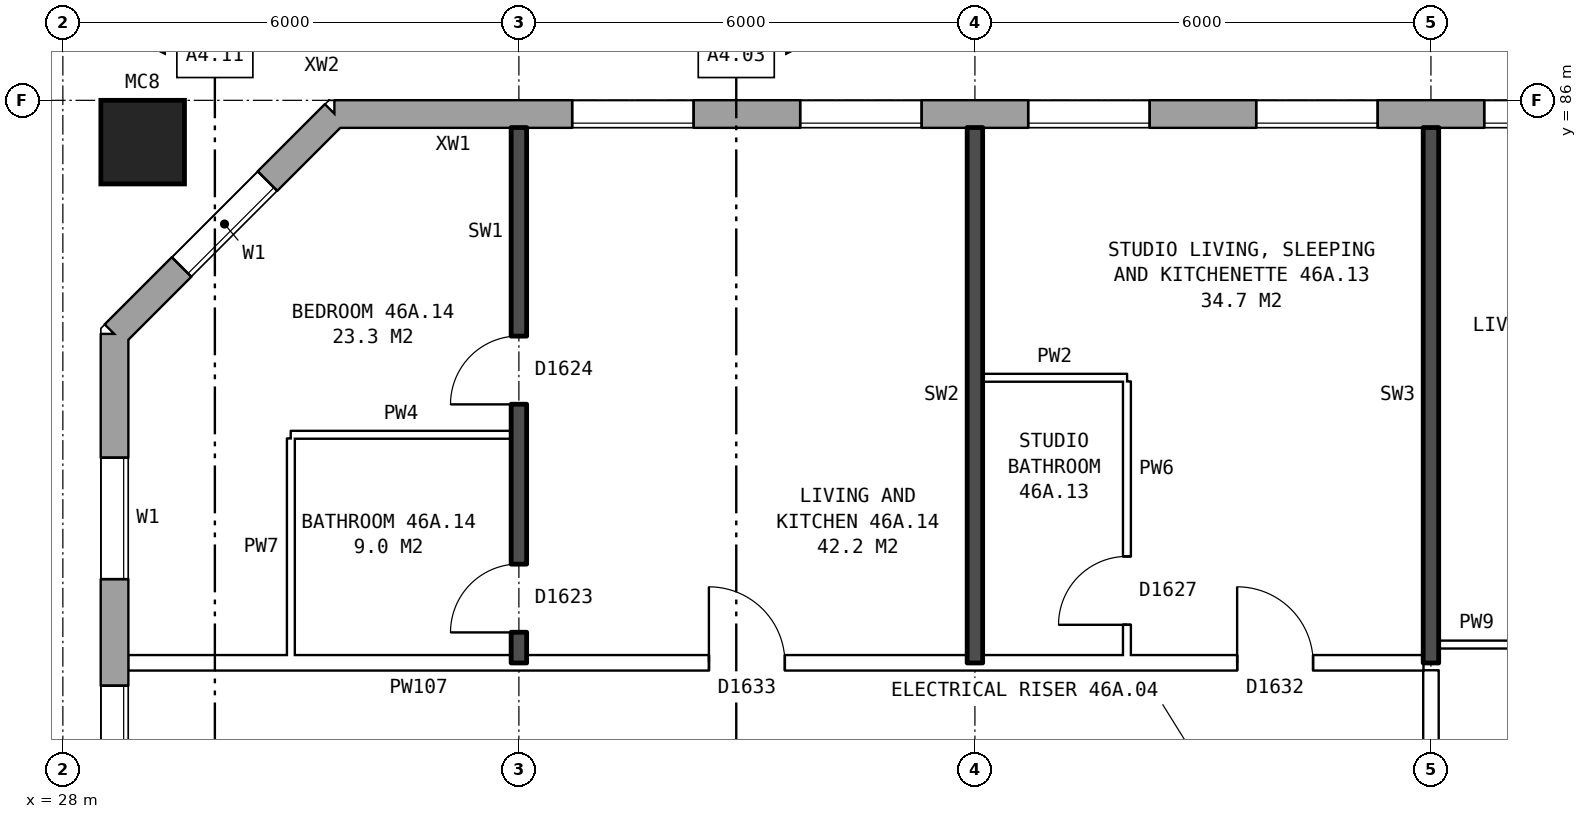
"""IFC4 building model, lengths in metres.
Left out: names, types, materials, properties, quantities, classifications, styles, units other than length and angle.
Written with IfcOpenShell. Run it as: python <this file> out.ifc"""

import sys

from ifc_helpers import new_model, si_unit, direction, frame, frame_2d, origin, origin_2d, place, context, subcontext, project, spatial, rectangle, hollow_rectangle, extrude, element, fill, save


model = new_model("IFC4")
c1 = context("Model", 3, precision=1e-05, world=origin(), true_north=direction((0.0, 1.0)))
c2 = subcontext(c1, "Body", "Model", "MODEL_VIEW")
j1 = project(units=[si_unit("LENGTHUNIT", "METRE"), si_unit("PLANEANGLEUNIT", "RADIAN")], contexts=[c1])
p1 = place(None, origin())
s1 = spatial("IfcSite", under=j1, at=p1, CompositionType="ELEMENT")
p2 = place(p1, origin())
s2 = spatial("IfcBuilding", under=s1, at=p2, CompositionType="ELEMENT")
p3 = place(p2, frame((0.0, 0.0, 164.0)))
s3 = spatial("IfcBuildingStorey", under=s2, at=p3, CompositionType="ELEMENT", Elevation=164.0)
p4 = place(p3, frame((29.05, 85.45, 0.0), z_axis=(0.0, 0.0, 1.0), x_axis=(1.0, 0.0, 0.0)))
e1 = element("IfcColumn", 1, at=p4, inside=s3, PredefinedType="COLUMN", context=c2, shape_type="SweptSolid", body=[
    extrude(hollow_rectangle(XDim=1.1, YDim=1.1, WallThickness=0.06, at=origin_2d()), origin(), (0.0, 0.0, 1.0), 3.1),
])
p5 = place(p3, frame((72.925, 85.82, 0.0), z_axis=(0.0, 0.0, 1.0), x_axis=(-1.0, 0.0, 0.0)))
e2 = element("IfcWall", 2, at=p5, inside=s3, PredefinedType="STANDARD", context=c2, shape_type="SweptSolid", body=[
    extrude(rectangle(XDim=41.351, YDim=0.36, at=frame_2d((20.675, 0.0))), origin(), (0.0, 0.0, 1.0), 2.85),
])
p6 = place(p5, frame((0.625, 0.0, 0.8)))
e3 = element("IfcOpeningElement", 3, at=p6, cuts=e2, PredefinedType="OPENING", context=c2, shape_type="SweptSolid", body=[
    extrude(rectangle(XDim=1.6, YDim=1.8, at=frame_2d((0.8, 0.9))), frame((0.0, 0.19, 0.0), z_axis=(0.0, -1.0, 0.0), x_axis=(1.0, 0.0, 0.0)), (0.0, 0.0, 1.0), 0.38),
])
p7 = place(p5, frame((3.625, 0.0, 0.8)))
e4 = element("IfcOpeningElement", 4, at=p7, cuts=e2, PredefinedType="OPENING", context=c2, shape_type="SweptSolid", body=[
    extrude(rectangle(XDim=1.6, YDim=1.8, at=frame_2d((0.8, 0.9))), frame((0.0, 0.19, 0.0), z_axis=(0.0, -1.0, 0.0), x_axis=(1.0, 0.0, 0.0)), (0.0, 0.0, 1.0), 0.38),
])
p8 = place(p5, frame((6.625, 0.0, 0.8)))
e5 = element("IfcOpeningElement", 5, at=p8, cuts=e2, PredefinedType="OPENING", context=c2, shape_type="SweptSolid", body=[
    extrude(rectangle(XDim=1.6, YDim=1.8, at=frame_2d((0.8, 0.9))), frame((0.0, 0.19, 0.0), z_axis=(0.0, -1.0, 0.0), x_axis=(1.0, 0.0, 0.0)), (0.0, 0.0, 1.0), 0.38),
])
p9 = place(p5, frame((9.625, 0.0, 0.8)))
e6 = element("IfcOpeningElement", 6, at=p9, cuts=e2, PredefinedType="OPENING", context=c2, shape_type="SweptSolid", body=[
    extrude(rectangle(XDim=1.6, YDim=1.8, at=frame_2d((0.8, 0.9))), frame((0.0, 0.19, 0.0), z_axis=(0.0, -1.0, 0.0), x_axis=(1.0, 0.0, 0.0)), (0.0, 0.0, 1.0), 0.38),
])
p10 = place(p5, frame((12.625, 0.0, 0.8)))
e7 = element("IfcOpeningElement", 7, at=p10, cuts=e2, PredefinedType="OPENING", context=c2, shape_type="SweptSolid", body=[
    extrude(rectangle(XDim=1.6, YDim=1.8, at=frame_2d((0.8, 0.9))), frame((0.0, 0.19, 0.0), z_axis=(0.0, -1.0, 0.0), x_axis=(1.0, 0.0, 0.0)), (0.0, 0.0, 1.0), 0.38),
])
p11 = place(p5, frame((15.625, 0.0, 0.8)))
e8 = element("IfcOpeningElement", 8, at=p11, cuts=e2, PredefinedType="OPENING", context=c2, shape_type="SweptSolid", body=[
    extrude(rectangle(XDim=1.6, YDim=1.8, at=frame_2d((0.8, 0.9))), frame((0.0, 0.19, 0.0), z_axis=(0.0, -1.0, 0.0), x_axis=(1.0, 0.0, 0.0)), (0.0, 0.0, 1.0), 0.38),
])
p12 = place(p5, frame((18.075, 0.0, 1.65)))
e9 = element("IfcOpeningElement", 9, at=p12, cuts=e2, PredefinedType="OPENING", context=c2, shape_type="SweptSolid", body=[
    extrude(rectangle(XDim=0.6, YDim=0.9, at=frame_2d((0.3, 0.45))), frame((0.0, 0.19, 0.0), z_axis=(0.0, -1.0, 0.0), x_axis=(1.0, 0.0, 0.0)), (0.0, 0.0, 1.0), 0.38),
])
p13 = place(p5, frame((21.125, 0.0, 0.15)))
e10 = element("IfcOpeningElement", 10, at=p13, cuts=e2, PredefinedType="OPENING", context=c2, shape_type="SweptSolid", body=[
    extrude(rectangle(XDim=1.0, YDim=0.9, at=frame_2d((0.5, 0.45))), frame((0.0, 0.19, 0.0), z_axis=(0.0, -1.0, 0.0), x_axis=(1.0, 0.0, 0.0)), (0.0, 0.0, 1.0), 0.38),
])
p14 = place(p5, frame((24.625, 0.0, 0.8)))
e11 = element("IfcOpeningElement", 11, at=p14, cuts=e2, PredefinedType="OPENING", context=c2, shape_type="SweptSolid", body=[
    extrude(rectangle(XDim=1.6, YDim=1.8, at=frame_2d((0.8, 0.9))), frame((0.0, 0.19, 0.0), z_axis=(0.0, -1.0, 0.0), x_axis=(1.0, 0.0, 0.0)), (0.0, 0.0, 1.0), 0.38),
])
p15 = place(p5, frame((27.625, 0.0, 0.8)))
e12 = element("IfcOpeningElement", 12, at=p15, cuts=e2, PredefinedType="OPENING", context=c2, shape_type="SweptSolid", body=[
    extrude(rectangle(XDim=1.6, YDim=1.8, at=frame_2d((0.8, 0.9))), frame((0.0, 0.19, 0.0), z_axis=(0.0, -1.0, 0.0), x_axis=(1.0, 0.0, 0.0)), (0.0, 0.0, 1.0), 0.38),
])
p16 = place(p5, frame((30.625, 0.0, 0.8)))
e13 = element("IfcOpeningElement", 13, at=p16, cuts=e2, PredefinedType="OPENING", context=c2, shape_type="SweptSolid", body=[
    extrude(rectangle(XDim=1.6, YDim=1.8, at=frame_2d((0.8, 0.9))), frame((0.0, 0.19, 0.0), z_axis=(0.0, -1.0, 0.0), x_axis=(1.0, 0.0, 0.0)), (0.0, 0.0, 1.0), 0.38),
])
p17 = place(p5, frame((33.625, 0.0, 0.8)))
e14 = element("IfcOpeningElement", 14, at=p17, cuts=e2, PredefinedType="OPENING", context=c2, shape_type="SweptSolid", body=[
    extrude(rectangle(XDim=1.6, YDim=1.8, at=frame_2d((0.8, 0.9))), frame((0.0, 0.19, 0.0), z_axis=(0.0, -1.0, 0.0), x_axis=(1.0, 0.0, 0.0)), (0.0, 0.0, 1.0), 0.38),
])
p18 = place(p5, frame((36.625, 0.0, 0.8)))
e15 = element("IfcOpeningElement", 15, at=p18, cuts=e2, PredefinedType="OPENING", context=c2, shape_type="SweptSolid", body=[
    extrude(rectangle(XDim=1.6, YDim=1.8, at=frame_2d((0.8, 0.9))), frame((0.0, 0.19, 0.0), z_axis=(0.0, -1.0, 0.0), x_axis=(1.0, 0.0, 0.0)), (0.0, 0.0, 1.0), 0.38),
])
p19 = place(p5, frame((19.225, 0.0, 0.15)))
e16 = element("IfcOpeningElement", 16, at=p19, cuts=e2, PredefinedType="OPENING", context=c2, shape_type="SweptSolid", body=[
    extrude(rectangle(XDim=0.6, YDim=0.9, at=frame_2d((0.3, 0.45))), frame((0.0, 0.19, 0.0), z_axis=(0.0, -1.0, 0.0), x_axis=(1.0, 0.0, 0.0)), (0.0, 0.0, 1.0), 0.38),
])
p20 = place(p5, frame((20.125, 0.0, 0.25)))
e17 = element("IfcOpeningElement", 17, at=p20, cuts=e2, PredefinedType="OPENING", context=c2, shape_type="SweptSolid", body=[
    extrude(rectangle(XDim=0.6, YDim=1.5, at=frame_2d((0.3, 0.75))), frame((0.0, 0.19, 0.0), z_axis=(0.0, -1.0, 0.0), x_axis=(1.0, 0.0, 0.0)), (0.0, 0.0, 1.0), 0.38),
])
p21 = place(p5, frame((22.625, 0.0, 1.65)))
e18 = element("IfcOpeningElement", 18, at=p21, cuts=e2, PredefinedType="OPENING", context=c2, shape_type="SweptSolid", body=[
    extrude(rectangle(XDim=1.0, YDim=0.9, at=frame_2d((0.5, 0.45))), frame((0.0, 0.19, 0.0), z_axis=(0.0, -1.0, 0.0), x_axis=(1.0, 0.0, 0.0)), (0.0, 0.0, 1.0), 0.38),
])
p22 = place(p3, frame((31.575, 85.82, 0.0), z_axis=(0.0, 0.0, 1.0), x_axis=(-0.707106781187, -0.707106781187, 0.0)))
e19 = element("IfcWall", 19, at=p22, inside=s3, PredefinedType="STANDARD", context=c2, shape_type="SweptSolid", body=[
    extrude(rectangle(XDim=4.094, YDim=0.36, at=frame_2d((2.047, 0.0))), origin(), (0.0, 0.0, 1.0), 2.85),
])
p23 = place(p22, frame((1.247, 0.0, 0.8)))
e20 = element("IfcOpeningElement", 20, at=p23, cuts=e19, PredefinedType="OPENING", context=c2, shape_type="SweptSolid", body=[
    extrude(rectangle(XDim=1.6, YDim=1.8, at=frame_2d((0.8, 0.9))), frame((0.0, 0.19, 0.0), z_axis=(0.0, -1.0, 0.0), x_axis=(1.0, 0.0, 0.0)), (0.0, 0.0, 1.0), 0.38),
])
p24 = place(p3, frame((28.68, 82.925, 0.0), z_axis=(0.0, 0.0, 1.0), x_axis=(0.0, -1.0, 0.0)))
e21 = element("IfcWall", 21, at=p24, inside=s3, PredefinedType="STANDARD", context=c2, shape_type="SweptSolid", body=[
    extrude(rectangle(XDim=25.851, YDim=0.36, at=frame_2d((12.925, 0.0))), origin(), (0.0, 0.0, 1.0), 2.85),
])
p25 = place(p24, frame((1.625, 0.0, 0.8)))
e22 = element("IfcOpeningElement", 22, at=p25, cuts=e21, PredefinedType="OPENING", context=c2, shape_type="SweptSolid", body=[
    extrude(rectangle(XDim=1.6, YDim=1.8, at=frame_2d((0.8, 0.9))), frame((0.0, 0.19, 0.0), z_axis=(0.0, -1.0, 0.0), x_axis=(1.0, 0.0, 0.0)), (0.0, 0.0, 1.0), 0.38),
])
p26 = place(p24, frame((4.625, 0.0, 0.8)))
e23 = element("IfcOpeningElement", 23, at=p26, cuts=e21, PredefinedType="OPENING", context=c2, shape_type="SweptSolid", body=[
    extrude(rectangle(XDim=1.6, YDim=1.8, at=frame_2d((0.8, 0.9))), frame((0.0, 0.19, 0.0), z_axis=(0.0, -1.0, 0.0), x_axis=(1.0, 0.0, 0.0)), (0.0, 0.0, 1.0), 0.38),
])
p27 = place(p24, frame((7.625, 0.0, 0.8)))
e24 = element("IfcOpeningElement", 24, at=p27, cuts=e21, PredefinedType="OPENING", context=c2, shape_type="SweptSolid", body=[
    extrude(rectangle(XDim=1.6, YDim=1.8, at=frame_2d((0.8, 0.9))), frame((0.0, 0.19, 0.0), z_axis=(0.0, -1.0, 0.0), x_axis=(1.0, 0.0, 0.0)), (0.0, 0.0, 1.0), 0.38),
])
p28 = place(p24, frame((10.625, 0.0, 0.8)))
e25 = element("IfcOpeningElement", 25, at=p28, cuts=e21, PredefinedType="OPENING", context=c2, shape_type="SweptSolid", body=[
    extrude(rectangle(XDim=1.6, YDim=1.8, at=frame_2d((0.8, 0.9))), frame((0.0, 0.19, 0.0), z_axis=(0.0, -1.0, 0.0), x_axis=(1.0, 0.0, 0.0)), (0.0, 0.0, 1.0), 0.38),
])
p29 = place(p24, frame((13.625, 0.0, 0.8)))
e26 = element("IfcOpeningElement", 26, at=p29, cuts=e21, PredefinedType="OPENING", context=c2, shape_type="SweptSolid", body=[
    extrude(rectangle(XDim=1.6, YDim=1.8, at=frame_2d((0.8, 0.9))), frame((0.0, 0.19, 0.0), z_axis=(0.0, -1.0, 0.0), x_axis=(1.0, 0.0, 0.0)), (0.0, 0.0, 1.0), 0.38),
])
p30 = place(p24, frame((16.625, 0.0, 0.8)))
e27 = element("IfcOpeningElement", 27, at=p30, cuts=e21, PredefinedType="OPENING", context=c2, shape_type="SweptSolid", body=[
    extrude(rectangle(XDim=1.6, YDim=1.8, at=frame_2d((0.8, 0.9))), frame((0.0, 0.19, 0.0), z_axis=(0.0, -1.0, 0.0), x_axis=(1.0, 0.0, 0.0)), (0.0, 0.0, 1.0), 0.38),
])
p31 = place(p24, frame((19.625, 0.0, 0.8)))
e28 = element("IfcOpeningElement", 28, at=p31, cuts=e21, PredefinedType="OPENING", context=c2, shape_type="SweptSolid", body=[
    extrude(rectangle(XDim=1.6, YDim=1.8, at=frame_2d((0.8, 0.9))), frame((0.0, 0.19, 0.0), z_axis=(0.0, -1.0, 0.0), x_axis=(1.0, 0.0, 0.0)), (0.0, 0.0, 1.0), 0.38),
])
p32 = place(p24, frame((22.625, 0.0, 0.8)))
e29 = element("IfcOpeningElement", 29, at=p32, cuts=e21, PredefinedType="OPENING", context=c2, shape_type="SweptSolid", body=[
    extrude(rectangle(XDim=1.6, YDim=1.8, at=frame_2d((0.8, 0.9))), frame((0.0, 0.19, 0.0), z_axis=(0.0, -1.0, 0.0), x_axis=(1.0, 0.0, 0.0)), (0.0, 0.0, 1.0), 0.38),
])
p33 = place(p3, frame((28.86, 78.6, 0.0), z_axis=(0.0, 0.0, 1.0), x_axis=(1.0, 0.0, 0.0)))
e30 = element("IfcWall", 30, at=p33, inside=s3, PredefinedType="PARTITIONING", context=c2, shape_type="SweptSolid", body=[
    extrude(rectangle(XDim=17.04, YDim=0.2, at=frame_2d((8.52, 0.0))), origin(), (0.0, 0.0, 1.0), 2.85),
])
p34 = place(p33, frame((14.59, 0.0, 0.0)))
e31 = element("IfcOpeningElement", 31, at=p34, cuts=e30, PredefinedType="OPENING", context=c2, shape_type="SweptSolid", body=[
    extrude(rectangle(XDim=1.0, YDim=2.1, at=frame_2d((0.5, 1.05))), frame((0.0, 0.11, 0.0), z_axis=(0.0, -1.0, 0.0), x_axis=(1.0, 0.0, 0.0)), (0.0, 0.0, 1.0), 0.22),
])
p35 = place(p33, frame((7.64, 0.0, 0.0)))
e32 = element("IfcOpeningElement", 32, at=p35, cuts=e30, PredefinedType="OPENING", context=c2, shape_type="SweptSolid", body=[
    extrude(rectangle(XDim=1.0, YDim=2.1, at=frame_2d((0.5, 1.05))), frame((0.0, 0.11, 0.0), z_axis=(0.0, -1.0, 0.0), x_axis=(1.0, 0.0, 0.0)), (0.0, 0.0, 1.0), 0.22),
])
p36 = place(p3, frame((46.1, 78.84, 0.0), z_axis=(0.0, 0.0, 1.0), x_axis=(1.0, 0.0, 0.0)))
e33 = element("IfcWall", 33, at=p36, inside=s3, PredefinedType="PARTITIONING", context=c2, shape_type="SweptSolid", body=[
    extrude(rectangle(XDim=2.9, YDim=0.1, at=frame_2d((1.45, 0.0))), origin(), (0.0, 0.0, 1.0), 2.85),
])
p37 = place(p36, frame((1.0, 0.0, 0.0)))
e34 = element("IfcOpeningElement", 34, at=p37, cuts=e33, PredefinedType="OPENING", context=c2, shape_type="SweptSolid", body=[
    extrude(rectangle(XDim=0.9, YDim=2.1, at=frame_2d((0.45, 1.05))), frame((0.0, 0.06, 0.0), z_axis=(0.0, -1.0, 0.0), x_axis=(1.0, 0.0, 0.0)), (0.0, 0.0, 1.0), 0.12),
])
p38 = place(p3, frame((31.0, 81.6, 0.0), z_axis=(0.0, 0.0, 1.0), x_axis=(1.0, 0.0, 0.0)))
e35 = element("IfcWall", 35, at=p38, inside=s3, PredefinedType="PARTITIONING", context=c2, shape_type="SweptSolid", body=[
    extrude(rectangle(XDim=2.9, YDim=0.1, at=frame_2d((1.45, 0.0))), origin(), (0.0, 0.0, 1.0), 2.85),
])
p39 = place(p3, frame((40.1, 82.35, 0.0), z_axis=(0.0, 0.0, 1.0), x_axis=(1.0, 0.0, 0.0)))
e36 = element("IfcWall", 36, at=p39, inside=s3, PredefinedType="PARTITIONING", context=c2, shape_type="SweptSolid", body=[
    extrude(rectangle(XDim=1.9, YDim=0.1, at=frame_2d((0.95, 0.0))), origin(), (0.0, 0.0, 1.0), 2.85),
])
p40 = place(p3, frame((31.0, 78.7, 0.0), z_axis=(0.0, 0.0, 1.0), x_axis=(0.0, 1.0, 0.0)))
e37 = element("IfcWall", 37, at=p40, inside=s3, PredefinedType="PARTITIONING", context=c2, shape_type="SweptSolid", body=[
    extrude(rectangle(XDim=2.85, YDim=0.1, at=frame_2d((1.425, 0.0))), origin(), (0.0, 0.0, 1.0), 2.85),
])
p41 = place(p3, frame((34.0, 78.6, 0.0), z_axis=(0.0, 0.0, 1.0), x_axis=(0.0, 1.0, 0.0)))
e38 = element("IfcWall", 38, at=p41, inside=s3, PredefinedType="SOLIDWALL", context=c2, shape_type="SweptSolid", body=[
    extrude(rectangle(XDim=7.04, YDim=0.2, at=frame_2d((3.52, 0.0))), origin(), (0.0, 0.0, 1.0), 2.85),
])
p42 = place(p41, frame((3.4, 0.0, 0.0)))
e39 = element("IfcOpeningElement", 39, at=p42, cuts=e38, PredefinedType="OPENING", context=c2, shape_type="SweptSolid", body=[
    extrude(rectangle(XDim=0.9, YDim=2.1, at=frame_2d((0.45, 1.05))), frame((0.0, 0.11, 0.0), z_axis=(0.0, -1.0, 0.0), x_axis=(1.0, 0.0, 0.0)), (0.0, 0.0, 1.0), 0.22),
])
p43 = place(p41, frame((0.4, 0.0, 0.0)))
e40 = element("IfcOpeningElement", 40, at=p43, cuts=e38, PredefinedType="OPENING", context=c2, shape_type="SweptSolid", body=[
    extrude(rectangle(XDim=0.9, YDim=2.1, at=frame_2d((0.45, 1.05))), frame((0.0, 0.11, 0.0), z_axis=(0.0, -1.0, 0.0), x_axis=(1.0, 0.0, 0.0)), (0.0, 0.0, 1.0), 0.22),
])
p44 = place(p3, frame((40.0, 78.6, 0.0), z_axis=(0.0, 0.0, 1.0), x_axis=(0.0, 1.0, 0.0)))
e41 = element("IfcWall", 41, at=p44, inside=s3, PredefinedType="SOLIDWALL", context=c2, shape_type="SweptSolid", body=[
    extrude(rectangle(XDim=7.04, YDim=0.2, at=frame_2d((3.52, 0.0))), origin(), (0.0, 0.0, 1.0), 2.85),
])
p45 = place(p3, frame((42.0, 78.7, 0.0), z_axis=(0.0, 0.0, 1.0), x_axis=(0.0, 1.0, 0.0)))
e42 = element("IfcWall", 42, at=p45, inside=s3, PredefinedType="PARTITIONING", context=c2, shape_type="SweptSolid", body=[
    extrude(rectangle(XDim=3.6, YDim=0.1, at=frame_2d((1.8, 0.0))), origin(), (0.0, 0.0, 1.0), 2.85),
])
p46 = place(p45, frame((0.4, 0.0, 0.0)))
e43 = element("IfcOpeningElement", 43, at=p46, cuts=e42, PredefinedType="OPENING", context=c2, shape_type="SweptSolid", body=[
    extrude(rectangle(XDim=0.9, YDim=2.1, at=frame_2d((0.45, 1.05))), frame((0.0, 0.06, 0.0), z_axis=(0.0, -1.0, 0.0), x_axis=(1.0, 0.0, 0.0)), (0.0, 0.0, 1.0), 0.12),
])
p47 = place(p3, frame((46.0, 76.3, 0.0), z_axis=(0.0, 0.0, 1.0), x_axis=(0.0, 1.0, 0.0)))
e44 = element("IfcWall", 44, at=p47, inside=s3, PredefinedType="PARTITIONING", context=c2, shape_type="SweptSolid", body=[
    extrude(rectangle(XDim=2.2, YDim=0.2, at=frame_2d((1.1, 0.0))), origin(), (0.0, 0.0, 1.0), 2.85),
])
p48 = place(p3, frame((46.0, 78.6, 0.0), z_axis=(0.0, 0.0, 1.0), x_axis=(0.0, 1.0, 0.0)))
e45 = element("IfcWall", 45, at=p48, inside=s3, PredefinedType="SOLIDWALL", context=c2, shape_type="SweptSolid", body=[
    extrude(rectangle(XDim=7.04, YDim=0.2, at=frame_2d((3.52, 0.0))), origin(), (0.0, 0.0, 1.0), 2.85),
])
p49 = place(p14, origin())
e46 = element("IfcWindow", 46, at=p49, inside=s3, PartitioningType="SINGLE_PANEL", PredefinedType="WINDOW", context=c2, shape_type="SweptSolid", body=[
    extrude(rectangle(XDim=1.6, YDim=1.8, at=frame_2d((0.8, 0.9))), frame((0.0, 0.15, 0.0), z_axis=(0.0, -1.0, 0.0), x_axis=(1.0, 0.0, 0.0)), (0.0, 0.0, 1.0), 0.06),
])
fill(e11, e46)
p50 = place(p15, origin())
e47 = element("IfcWindow", 47, at=p50, inside=s3, PartitioningType="SINGLE_PANEL", PredefinedType="WINDOW", context=c2, shape_type="SweptSolid", body=[
    extrude(rectangle(XDim=1.6, YDim=1.8, at=frame_2d((0.8, 0.9))), frame((0.0, 0.15, 0.0), z_axis=(0.0, -1.0, 0.0), x_axis=(1.0, 0.0, 0.0)), (0.0, 0.0, 1.0), 0.06),
])
fill(e12, e47)
p51 = place(p16, origin())
e48 = element("IfcWindow", 48, at=p51, inside=s3, PartitioningType="SINGLE_PANEL", PredefinedType="WINDOW", context=c2, shape_type="SweptSolid", body=[
    extrude(rectangle(XDim=1.6, YDim=1.8, at=frame_2d((0.8, 0.9))), frame((0.0, 0.15, 0.0), z_axis=(0.0, -1.0, 0.0), x_axis=(1.0, 0.0, 0.0)), (0.0, 0.0, 1.0), 0.06),
])
fill(e13, e48)
p52 = place(p17, origin())
e49 = element("IfcWindow", 49, at=p52, inside=s3, PartitioningType="SINGLE_PANEL", PredefinedType="WINDOW", context=c2, shape_type="SweptSolid", body=[
    extrude(rectangle(XDim=1.6, YDim=1.8, at=frame_2d((0.8, 0.9))), frame((0.0, 0.15, 0.0), z_axis=(0.0, -1.0, 0.0), x_axis=(1.0, 0.0, 0.0)), (0.0, 0.0, 1.0), 0.06),
])
fill(e14, e49)
p53 = place(p18, origin())
e50 = element("IfcWindow", 50, at=p53, inside=s3, PartitioningType="SINGLE_PANEL", PredefinedType="WINDOW", context=c2, shape_type="SweptSolid", body=[
    extrude(rectangle(XDim=1.6, YDim=1.8, at=frame_2d((0.8, 0.9))), frame((0.0, 0.15, 0.0), z_axis=(0.0, -1.0, 0.0), x_axis=(1.0, 0.0, 0.0)), (0.0, 0.0, 1.0), 0.06),
])
fill(e15, e50)
p54 = place(p23, origin())
e51 = element("IfcWindow", 51, at=p54, inside=s3, PartitioningType="SINGLE_PANEL", PredefinedType="WINDOW", context=c2, shape_type="SweptSolid", body=[
    extrude(rectangle(XDim=1.6, YDim=1.8, at=frame_2d((0.8, 0.9))), frame((0.0, 0.15, 0.0), z_axis=(0.0, -1.0, 0.0), x_axis=(1.0, 0.0, 0.0)), (0.0, 0.0, 1.0), 0.06),
])
fill(e20, e51)
p55 = place(p25, origin())
e52 = element("IfcWindow", 52, at=p55, inside=s3, PartitioningType="SINGLE_PANEL", PredefinedType="WINDOW", context=c2, shape_type="SweptSolid", body=[
    extrude(rectangle(XDim=1.6, YDim=1.8, at=frame_2d((0.8, 0.9))), frame((0.0, 0.15, 0.0), z_axis=(0.0, -1.0, 0.0), x_axis=(1.0, 0.0, 0.0)), (0.0, 0.0, 1.0), 0.06),
])
fill(e22, e52)
p56 = place(p26, origin())
e53 = element("IfcWindow", 53, at=p56, inside=s3, PartitioningType="SINGLE_PANEL", PredefinedType="WINDOW", context=c2, shape_type="SweptSolid", body=[
    extrude(rectangle(XDim=1.6, YDim=1.8, at=frame_2d((0.8, 0.9))), frame((0.0, 0.15, 0.0), z_axis=(0.0, -1.0, 0.0), x_axis=(1.0, 0.0, 0.0)), (0.0, 0.0, 1.0), 0.06),
])
fill(e23, e53)
p57 = place(p34, origin())
e54 = element("IfcDoor", 54, at=p57, inside=s3, OperationType="SINGLE_SWING_LEFT", PredefinedType="DOOR", context=c2, shape_type="SweptSolid", body=[
    extrude(rectangle(XDim=1.0, YDim=2.1, at=frame_2d((0.5, 1.05))), frame((0.0, 0.025, 0.0), z_axis=(0.0, -1.0, 0.0), x_axis=(1.0, 0.0, 0.0)), (0.0, 0.0, 1.0), 0.05),
])
fill(e31, e54)
p58 = place(p46, origin())
e55 = element("IfcDoor", 55, at=p58, inside=s3, OperationType="SINGLE_SWING_LEFT", PredefinedType="DOOR", context=c2, shape_type="SweptSolid", body=[
    extrude(rectangle(XDim=0.9, YDim=2.1, at=frame_2d((0.45, 1.05))), frame((0.0, 0.025, 0.0), z_axis=(0.0, -1.0, 0.0), x_axis=(1.0, 0.0, 0.0)), (0.0, 0.0, 1.0), 0.05),
])
fill(e43, e55)
p59 = place(p42, origin())
e56 = element("IfcDoor", 56, at=p59, inside=s3, OperationType="SINGLE_SWING_LEFT", PredefinedType="DOOR", context=c2, shape_type="SweptSolid", body=[
    extrude(rectangle(XDim=0.9, YDim=2.1, at=frame_2d((0.45, 1.05))), frame((0.0, 0.025, 0.0), z_axis=(0.0, -1.0, 0.0), x_axis=(1.0, 0.0, 0.0)), (0.0, 0.0, 1.0), 0.05),
])
fill(e39, e56)
p60 = place(p35, origin())
e57 = element("IfcDoor", 57, at=p60, inside=s3, OperationType="SINGLE_SWING_LEFT", PredefinedType="DOOR", context=c2, shape_type="SweptSolid", body=[
    extrude(rectangle(XDim=1.0, YDim=2.1, at=frame_2d((0.5, 1.05))), frame((0.0, 0.025, 0.0), z_axis=(0.0, -1.0, 0.0), x_axis=(1.0, 0.0, 0.0)), (0.0, 0.0, 1.0), 0.05),
])
fill(e32, e57)
p61 = place(p43, origin())
e58 = element("IfcDoor", 58, at=p61, inside=s3, OperationType="SINGLE_SWING_LEFT", PredefinedType="DOOR", context=c2, shape_type="SweptSolid", body=[
    extrude(rectangle(XDim=0.9, YDim=2.1, at=frame_2d((0.45, 1.05))), frame((0.0, 0.025, 0.0), z_axis=(0.0, -1.0, 0.0), x_axis=(1.0, 0.0, 0.0)), (0.0, 0.0, 1.0), 0.05),
])
fill(e40, e58)
save(model, sys.argv[1])
